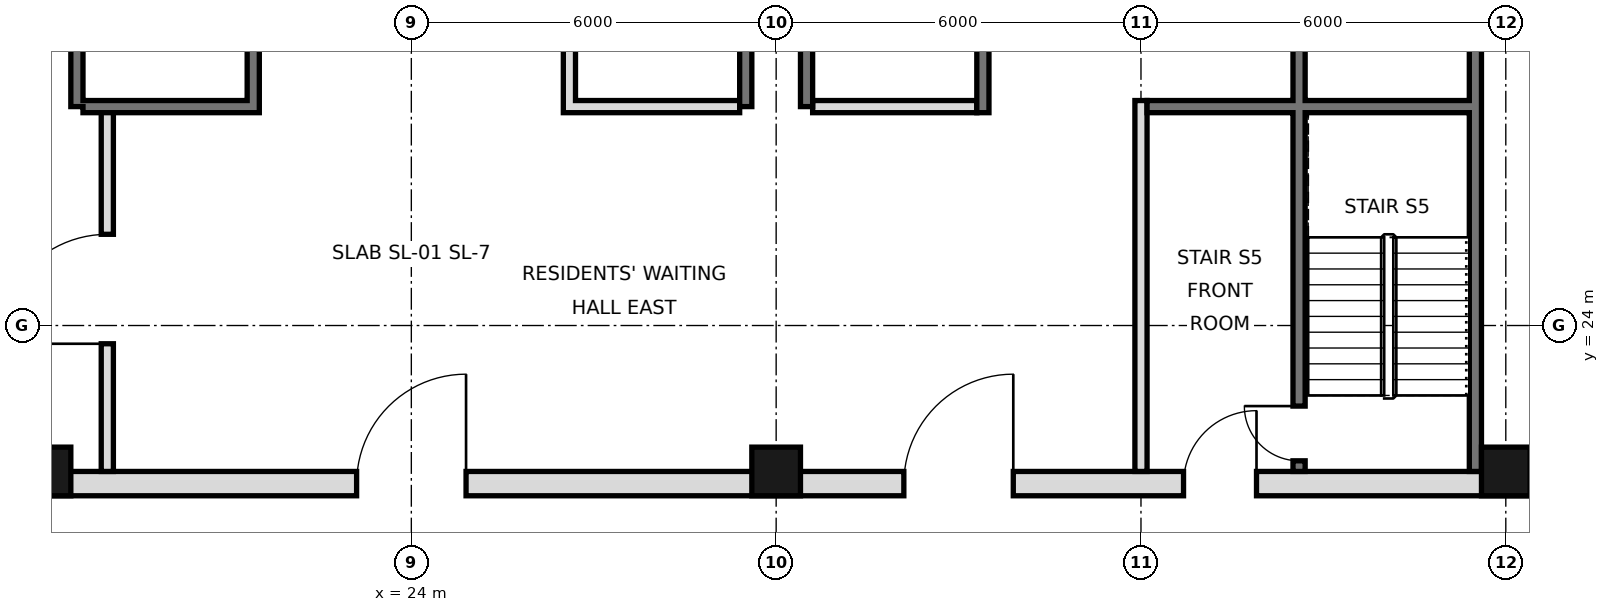
"""IFC4 building model, lengths in metres.
Left out: names, types, materials, properties, quantities, classifications, styles, units other than length and angle.
Written with IfcOpenShell. Run it as: python <this file> out.ifc"""

import sys

from ifc_helpers import new_model, si_unit, direction, frame, frame_2d, origin, origin_2d, place, context, subcontext, project, spatial, rectangle, hollow_rectangle, extrude, element, fill, save


model = new_model("IFC4")
c1 = context("Model", 3, precision=1e-05, world=origin(), true_north=direction((0.0, 1.0)))
c2 = subcontext(c1, "Body", "Model", "MODEL_VIEW")
j1 = project(units=[si_unit("LENGTHUNIT", "METRE"), si_unit("PLANEANGLEUNIT", "RADIAN")], contexts=[c1])
p1 = place(None, origin())
s1 = spatial("IfcSite", under=j1, at=p1, CompositionType="ELEMENT")
p2 = place(p1, origin())
s2 = spatial("IfcBuilding", under=s1, at=p2, CompositionType="ELEMENT")
p3 = place(p2, frame((0.0, 0.0, 107.0)))
s3 = spatial("IfcBuildingStorey", under=s2, at=p3, CompositionType="ELEMENT", Elevation=107.0)
for number, where, z_axis, x_axis in (
    (1, (18.0, 21.6, 0.0), (0.0, 0.0, 1.0), (1.0, 0.0, 0.0)),
    (2, (30.0, 21.6, 0.0), (0.0, 0.0, 1.0), (1.0, 0.0, 0.0)),
    (3, (42.0, 21.6, 0.0), (0.0, 0.0, 1.0), (1.0, 0.0, 0.0)),
):
    element("IfcColumn", number, at=place(p3, frame(where, z_axis=z_axis, x_axis=x_axis)), inside=s3, PredefinedType="COLUMN", context=c2, shape_type="SweptSolid", body=[
        extrude(hollow_rectangle(XDim=0.8, YDim=0.8, WallThickness=0.05, at=origin_2d()), origin(), (0.0, 0.0, 1.0), 3.6),
    ])
p4 = place(p3, frame((41.5, 21.6, 0.0), z_axis=(0.0, 0.0, 1.0), x_axis=(0.0, 1.0, 0.0)))
e4 = element("IfcWall", 4, at=p4, inside=s3, PredefinedType="SOLIDWALL", context=c2, shape_type="SweptSolid", body=[
    extrude(rectangle(XDim=23.5, YDim=0.2, at=frame_2d((11.75, 0.0))), origin(), (0.0, 0.0, 1.0), 3.42),
])
for number, where, z_axis, x_axis in (
    (5, (18.5, 27.6, 0.0), (0.0, 0.0, 1.0), (0.0, 1.0, 0.0)),
    (6, (29.5, 27.6, 0.0), (0.0, 0.0, 1.0), (0.0, 1.0, 0.0)),
    (7, (30.5, 27.6, 0.0), (0.0, 0.0, 1.0), (0.0, 1.0, 0.0)),
):
    element("IfcWall", number, at=place(p3, frame(where, z_axis=z_axis, x_axis=x_axis)), inside=s3, PredefinedType="SOLIDWALL", context=c2, shape_type="SweptSolid", body=[
        extrude(rectangle(XDim=17.5, YDim=0.2, at=frame_2d((8.75, 0.0))), origin(), (0.0, 0.0, 1.0), 3.42),
    ])
p5 = place(p3, frame((5.6, 21.4, 0.0), z_axis=(0.0, 0.0, 1.0), x_axis=(1.0, 0.0, 0.0)))
e8 = element("IfcWall", 8, at=p5, inside=s3, PredefinedType="SOLIDWALL", context=c2, shape_type="SweptSolid", body=[
    extrude(rectangle(XDim=36.8, YDim=0.4, at=frame_2d((18.4, 0.0))), origin(), (0.0, 0.0, 1.0), 3.42),
])
p6 = place(p5, frame((8.5, 0.0, 0.0)))
e9 = element("IfcOpeningElement", 9, at=p6, cuts=e8, PredefinedType="OPENING", context=c2, shape_type="SweptSolid", body=[
    extrude(rectangle(XDim=1.8, YDim=2.1, at=frame_2d((0.9, 1.05))), frame((0.0, 0.21, 0.0), z_axis=(0.0, -1.0, 0.0), x_axis=(1.0, 0.0, 0.0)), (0.0, 0.0, 1.0), 0.42),
])
p7 = place(p5, frame((17.5, 0.0, 0.0)))
e10 = element("IfcOpeningElement", 10, at=p7, cuts=e8, PredefinedType="OPENING", context=c2, shape_type="SweptSolid", body=[
    extrude(rectangle(XDim=1.8, YDim=2.1, at=frame_2d((0.9, 1.05))), frame((0.0, 0.21, 0.0), z_axis=(0.0, -1.0, 0.0), x_axis=(1.0, 0.0, 0.0)), (0.0, 0.0, 1.0), 0.42),
])
p8 = place(p5, frame((26.5, 0.0, 0.0)))
e11 = element("IfcOpeningElement", 11, at=p8, cuts=e8, PredefinedType="OPENING", context=c2, shape_type="SweptSolid", body=[
    extrude(rectangle(XDim=1.8, YDim=2.1, at=frame_2d((0.9, 1.05))), frame((0.0, 0.21, 0.0), z_axis=(0.0, -1.0, 0.0), x_axis=(1.0, 0.0, 0.0)), (0.0, 0.0, 1.0), 0.42),
])
p9 = place(p5, frame((4.5, 0.0, 0.0)))
e12 = element("IfcOpeningElement", 12, at=p9, cuts=e8, PredefinedType="OPENING", context=c2, shape_type="SweptSolid", body=[
    extrude(rectangle(XDim=1.2, YDim=2.1, at=frame_2d((0.6, 1.05))), frame((0.0, 0.21, 0.0), z_axis=(0.0, -1.0, 0.0), x_axis=(1.0, 0.0, 0.0)), (0.0, 0.0, 1.0), 0.42),
])
p10 = place(p5, frame((31.1, 0.0, 0.0)))
e13 = element("IfcOpeningElement", 13, at=p10, cuts=e8, PredefinedType="OPENING", context=c2, shape_type="SweptSolid", body=[
    extrude(rectangle(XDim=1.2, YDim=2.1, at=frame_2d((0.6, 1.05))), frame((0.0, 0.21, 0.0), z_axis=(0.0, -1.0, 0.0), x_axis=(1.0, 0.0, 0.0)), (0.0, 0.0, 1.0), 0.42),
])
p11 = place(p3, frame((19.0, 21.6, 0.0), z_axis=(0.0, 0.0, 1.0), x_axis=(0.0, 1.0, 0.0)))
e14 = element("IfcWall", 14, at=p11, inside=s3, PredefinedType="PARTITIONING", context=c2, shape_type="SweptSolid", body=[
    extrude(rectangle(XDim=6.0, YDim=0.2, at=frame_2d((3.0, 0.0))), origin(), (0.0, 0.0, 1.0), 3.42),
])
p12 = place(p11, frame((2.1, 0.0, 0.0)))
e15 = element("IfcOpeningElement", 15, at=p12, cuts=e14, PredefinedType="OPENING", context=c2, shape_type="SweptSolid", body=[
    extrude(rectangle(XDim=1.8, YDim=2.1, at=frame_2d((0.9, 1.05))), frame((0.0, 0.11, 0.0), z_axis=(0.0, -1.0, 0.0), x_axis=(1.0, 0.0, 0.0)), (0.0, 0.0, 1.0), 0.22),
])
p13 = place(p3, frame((21.4, 27.5, 0.0), z_axis=(0.0, 0.0, 1.0), x_axis=(0.0, 1.0, 0.0)))
e16 = element("IfcWall", 16, at=p13, inside=s3, PredefinedType="SOLIDWALL", context=c2, shape_type="SweptSolid", body=[
    extrude(rectangle(XDim=17.5, YDim=0.2, at=frame_2d((8.75, 0.0))), origin(), (0.0, 0.0, 1.0), 3.42),
])
p14 = place(p13, frame((16.2, 0.0, 0.0)))
e17 = element("IfcOpeningElement", 17, at=p14, cuts=e16, PredefinedType="OPENING", context=c2, shape_type="SweptSolid", body=[
    extrude(rectangle(XDim=1.0, YDim=2.1, at=frame_2d((0.5, 1.05))), frame((0.0, 0.11, 0.0), z_axis=(0.0, -1.0, 0.0), x_axis=(1.0, 0.0, 0.0)), (0.0, 0.0, 1.0), 0.22),
])
p15 = place(p13, frame((7.4, 0.0, 0.0)))
e18 = element("IfcOpeningElement", 18, at=p15, cuts=e16, PredefinedType="OPENING", context=c2, shape_type="SweptSolid", body=[
    extrude(rectangle(XDim=0.9, YDim=2.1, at=frame_2d((0.45, 1.05))), frame((0.0, 0.11, 0.0), z_axis=(0.0, -1.0, 0.0), x_axis=(1.0, 0.0, 0.0)), (0.0, 0.0, 1.0), 0.22),
])
p16 = place(p3, frame((26.6, 27.5, 0.0), z_axis=(0.0, 0.0, 1.0), x_axis=(0.0, 1.0, 0.0)))
e19 = element("IfcWall", 19, at=p16, inside=s3, PredefinedType="SOLIDWALL", context=c2, shape_type="SweptSolid", body=[
    extrude(rectangle(XDim=17.5, YDim=0.2, at=frame_2d((8.75, 0.0))), origin(), (0.0, 0.0, 1.0), 3.42),
])
p17 = place(p16, frame((4.3, 0.0, 0.0)))
e20 = element("IfcOpeningElement", 20, at=p17, cuts=e19, PredefinedType="OPENING", context=c2, shape_type="SweptSolid", body=[
    extrude(rectangle(XDim=0.9, YDim=2.1, at=frame_2d((0.45, 1.05))), frame((0.0, 0.11, 0.0), z_axis=(0.0, -1.0, 0.0), x_axis=(1.0, 0.0, 0.0)), (0.0, 0.0, 1.0), 0.22),
])
p18 = place(p16, frame((10.35, 0.0, 0.0)))
e21 = element("IfcOpeningElement", 21, at=p18, cuts=e19, PredefinedType="OPENING", context=c2, shape_type="SweptSolid", body=[
    extrude(rectangle(XDim=1.0, YDim=2.1, at=frame_2d((0.5, 1.05))), frame((0.0, 0.11, 0.0), z_axis=(0.0, -1.0, 0.0), x_axis=(1.0, 0.0, 0.0)), (0.0, 0.0, 1.0), 0.22),
])
p19 = place(p3, frame((33.4, 27.5, 0.0), z_axis=(0.0, 0.0, 1.0), x_axis=(0.0, 1.0, 0.0)))
e22 = element("IfcWall", 22, at=p19, inside=s3, PredefinedType="SOLIDWALL", context=c2, shape_type="SweptSolid", body=[
    extrude(rectangle(XDim=17.5, YDim=0.2, at=frame_2d((8.75, 0.0))), origin(), (0.0, 0.0, 1.0), 3.42),
])
p20 = place(p19, frame((15.4, 0.0, 0.0)))
e23 = element("IfcOpeningElement", 23, at=p20, cuts=e22, PredefinedType="OPENING", context=c2, shape_type="SweptSolid", body=[
    extrude(rectangle(XDim=1.1, YDim=2.1, at=frame_2d((0.55, 1.05))), frame((0.0, 0.11, 0.0), z_axis=(0.0, -1.0, 0.0), x_axis=(1.0, 0.0, 0.0)), (0.0, 0.0, 1.0), 0.22),
])
p21 = place(p19, frame((2.7, 0.0, 0.0)))
e24 = element("IfcOpeningElement", 24, at=p21, cuts=e22, PredefinedType="OPENING", context=c2, shape_type="SweptSolid", body=[
    extrude(rectangle(XDim=1.0, YDim=2.1, at=frame_2d((0.5, 1.05))), frame((0.0, 0.11, 0.0), z_axis=(0.0, -1.0, 0.0), x_axis=(1.0, 0.0, 0.0)), (0.0, 0.0, 1.0), 0.22),
])
p22 = place(p19, frame((9.9, 0.0, 0.0)))
e25 = element("IfcOpeningElement", 25, at=p22, cuts=e22, PredefinedType="OPENING", context=c2, shape_type="SweptSolid", body=[
    extrude(rectangle(XDim=0.9, YDim=2.1, at=frame_2d((0.45, 1.05))), frame((0.0, 0.11, 0.0), z_axis=(0.0, -1.0, 0.0), x_axis=(1.0, 0.0, 0.0)), (0.0, 0.0, 1.0), 0.22),
])
p23 = place(p3, frame((36.0, 21.6, 0.0), z_axis=(0.0, 0.0, 1.0), x_axis=(0.0, 1.0, 0.0)))
e26 = element("IfcWall", 26, at=p23, inside=s3, PredefinedType="PARTITIONING", context=c2, shape_type="SweptSolid", body=[
    extrude(rectangle(XDim=6.1, YDim=0.2, at=frame_2d((3.05, 0.0))), origin(), (0.0, 0.0, 1.0), 3.42),
])
p24 = place(p3, frame((38.6, 21.6, 0.0), z_axis=(0.0, 0.0, 1.0), x_axis=(0.0, 1.0, 0.0)))
e27 = element("IfcWall", 27, at=p24, inside=s3, PredefinedType="SOLIDWALL", context=c2, shape_type="SweptSolid", body=[
    extrude(rectangle(XDim=23.4, YDim=0.2, at=frame_2d((11.7, 0.0))), origin(), (0.0, 0.0, 1.0), 3.42),
])
p25 = place(p24, frame((8.6, 0.0, 0.0)))
e28 = element("IfcOpeningElement", 28, at=p25, cuts=e27, PredefinedType="OPENING", context=c2, shape_type="SweptSolid", body=[
    extrude(rectangle(XDim=1.0, YDim=2.1, at=frame_2d((0.5, 1.05))), frame((0.0, 0.11, 0.0), z_axis=(0.0, -1.0, 0.0), x_axis=(1.0, 0.0, 0.0)), (0.0, 0.0, 1.0), 0.22),
])
p26 = place(p24, frame((13.25, 0.0, 0.0)))
e29 = element("IfcOpeningElement", 29, at=p26, cuts=e27, PredefinedType="OPENING", context=c2, shape_type="SweptSolid", body=[
    extrude(rectangle(XDim=1.0, YDim=2.1, at=frame_2d((0.5, 1.05))), frame((0.0, 0.11, 0.0), z_axis=(0.0, -1.0, 0.0), x_axis=(1.0, 0.0, 0.0)), (0.0, 0.0, 1.0), 0.22),
])
p27 = place(p24, frame((22.1, 0.0, 0.0)))
e30 = element("IfcOpeningElement", 30, at=p27, cuts=e27, PredefinedType="OPENING", context=c2, shape_type="SweptSolid", body=[
    extrude(rectangle(XDim=1.0, YDim=2.1, at=frame_2d((0.5, 1.05))), frame((0.0, 0.11, 0.0), z_axis=(0.0, -1.0, 0.0), x_axis=(1.0, 0.0, 0.0)), (0.0, 0.0, 1.0), 0.22),
])
p28 = place(p24, frame((0.175, 0.0, 0.0)))
e31 = element("IfcOpeningElement", 31, at=p28, cuts=e27, PredefinedType="OPENING", context=c2, shape_type="SweptSolid", body=[
    extrude(rectangle(XDim=0.9, YDim=2.1, at=frame_2d((0.45, 1.05))), frame((0.0, 0.11, 0.0), z_axis=(0.0, -1.0, 0.0), x_axis=(1.0, 0.0, 0.0)), (0.0, 0.0, 1.0), 0.22),
])
for number, where, z_axis, x_axis in (
    (32, (18.6, 27.6, 0.0), (0.0, 0.0, 1.0), (1.0, 0.0, 0.0)),
    (33, (26.7, 27.6, 0.0), (0.0, 0.0, 1.0), (1.0, 0.0, 0.0)),
):
    element("IfcWall", number, at=place(p3, frame(where, z_axis=z_axis, x_axis=x_axis)), inside=s3, PredefinedType="SOLIDWALL", context=c2, shape_type="SweptSolid", body=[
        extrude(rectangle(XDim=2.7, YDim=0.2, at=frame_2d((1.35, 0.0))), origin(), (0.0, 0.0, 1.0), 3.42),
    ])
p29 = place(p3, frame((30.6, 27.6, 0.0), z_axis=(0.0, 0.0, 1.0), x_axis=(1.0, 0.0, 0.0)))
e34 = element("IfcWall", 34, at=p29, inside=s3, PredefinedType="PARTITIONING", context=c2, shape_type="SweptSolid", body=[
    extrude(rectangle(XDim=2.7, YDim=0.2, at=frame_2d((1.35, 0.0))), origin(), (0.0, 0.0, 1.0), 3.42),
])
p30 = place(p3, frame((36.1, 27.6, 0.0), z_axis=(0.0, 0.0, 1.0), x_axis=(1.0, 0.0, 0.0)))
e35 = element("IfcWall", 35, at=p30, inside=s3, PredefinedType="SOLIDWALL", context=c2, shape_type="SweptSolid", body=[
    extrude(rectangle(XDim=5.3, YDim=0.2, at=frame_2d((2.65, 0.0))), origin(), (0.0, 0.0, 1.0), 3.42),
])
p31 = place(p12, origin())
e36 = element("IfcDoor", 36, at=p31, inside=s3, OperationType="SINGLE_SWING_LEFT", PredefinedType="DOOR", context=c2, shape_type="SweptSolid", body=[
    extrude(rectangle(XDim=1.8, YDim=2.1, at=frame_2d((0.9, 1.05))), frame((0.0, 0.025, 0.0), z_axis=(0.0, -1.0, 0.0), x_axis=(1.0, 0.0, 0.0)), (0.0, 0.0, 1.0), 0.05),
])
fill(e15, e36)
p32 = place(p7, frame((1.8, 0.0, 0.0), z_axis=(0.0, 0.0, 1.0), x_axis=(-1.0, 0.0, 0.0)))
e37 = element("IfcDoor", 37, at=p32, inside=s3, OperationType="SINGLE_SWING_LEFT", PredefinedType="DOOR", context=c2, shape_type="SweptSolid", body=[
    extrude(rectangle(XDim=1.8, YDim=2.1, at=frame_2d((0.9, 1.05))), frame((0.0, 0.025, 0.0), z_axis=(0.0, -1.0, 0.0), x_axis=(1.0, 0.0, 0.0)), (0.0, 0.0, 1.0), 0.05),
])
fill(e10, e37)
p33 = place(p8, frame((1.8, 0.0, 0.0), z_axis=(0.0, 0.0, 1.0), x_axis=(-1.0, 0.0, 0.0)))
e38 = element("IfcDoor", 38, at=p33, inside=s3, OperationType="SINGLE_SWING_LEFT", PredefinedType="DOOR", context=c2, shape_type="SweptSolid", body=[
    extrude(rectangle(XDim=1.8, YDim=2.1, at=frame_2d((0.9, 1.05))), frame((0.0, 0.025, 0.0), z_axis=(0.0, -1.0, 0.0), x_axis=(1.0, 0.0, 0.0)), (0.0, 0.0, 1.0), 0.05),
])
fill(e11, e38)
p34 = place(p10, frame((1.2, 0.0, 0.0), z_axis=(0.0, 0.0, 1.0), x_axis=(-1.0, 0.0, 0.0)))
e39 = element("IfcDoor", 39, at=p34, inside=s3, OperationType="SINGLE_SWING_LEFT", PredefinedType="DOOR", context=c2, shape_type="SweptSolid", body=[
    extrude(rectangle(XDim=1.2, YDim=2.1, at=frame_2d((0.6, 1.05))), frame((0.0, 0.025, 0.0), z_axis=(0.0, -1.0, 0.0), x_axis=(1.0, 0.0, 0.0)), (0.0, 0.0, 1.0), 0.05),
])
fill(e13, e39)
p35 = place(p28, frame((0.9, 0.0, 0.0), z_axis=(0.0, 0.0, 1.0), x_axis=(-1.0, 0.0, 0.0)))
e40 = element("IfcDoor", 40, at=p35, inside=s3, OperationType="SINGLE_SWING_LEFT", PredefinedType="DOOR", context=c2, shape_type="SweptSolid", body=[
    extrude(rectangle(XDim=0.9, YDim=2.1, at=frame_2d((0.45, 1.05))), frame((0.0, 0.025, 0.0), z_axis=(0.0, -1.0, 0.0), x_axis=(1.0, 0.0, 0.0)), (0.0, 0.0, 1.0), 0.05),
])
fill(e31, e40)
save(model, sys.argv[1])
